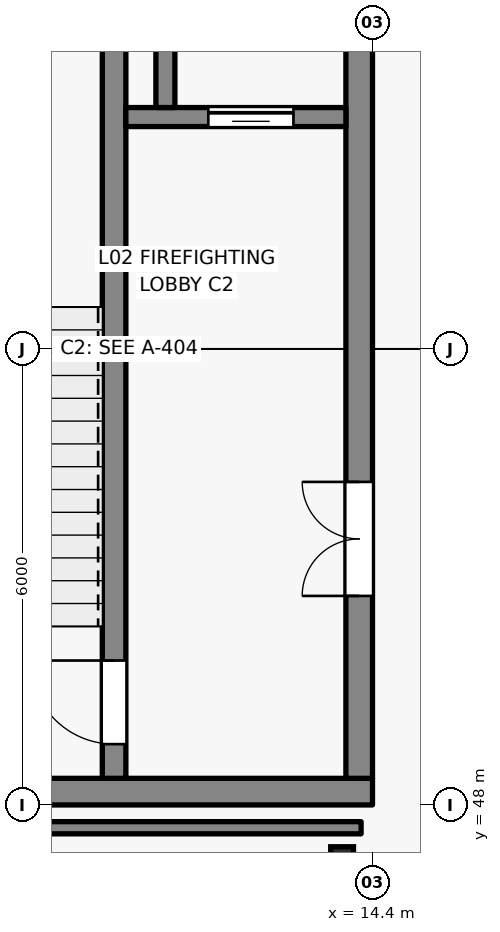
"""IFC4 building model, lengths in metres.
Left out: names, types, materials, properties, quantities, classifications, styles, units other than length and angle.
Written with IfcOpenShell. Run it as: python <this file> out.ifc"""

import sys

from ifc_helpers import new_model, si_unit, direction, frame, frame_2d, origin, origin_2d, place, context, subcontext, project, spatial, rectangle, i_section, extrude, element, fill, save


model = new_model("IFC4")
c1 = context("Model", 3, precision=1e-05, world=origin(), true_north=direction((0.0, 1.0)))
c2 = subcontext(c1, "Body", "Model", "MODEL_VIEW")
j1 = project(units=[si_unit("LENGTHUNIT", "METRE"), si_unit("PLANEANGLEUNIT", "RADIAN")], contexts=[c1])
p1 = place(None, origin())
s1 = spatial("IfcSite", under=j1, at=p1, CompositionType="ELEMENT")
p2 = place(p1, origin())
s2 = spatial("IfcBuilding", under=s1, at=p2, CompositionType="ELEMENT")
p3 = place(p2, frame((0.0, 0.0, 6.0)))
s3 = spatial("IfcBuildingStorey", under=s2, at=p3, CompositionType="ELEMENT", Elevation=6.0)
p4 = place(p3, frame((7.2, 48.175, 0.0), z_axis=(0.0, 0.0, 1.0), x_axis=(1.0, 0.0, 0.0)))
e1 = element("IfcWall", 1, at=p4, inside=s3, PredefinedType="SHEAR", context=c2, shape_type="SweptSolid", body=[
    extrude(rectangle(XDim=7.2, YDim=0.35, at=frame_2d((3.6, 0.0))), origin(), (0.0, 0.0, 1.0), 4.25),
])
p5 = place(p3, frame((14.225, 48.35, 0.0), z_axis=(0.0, 0.0, 1.0), x_axis=(0.0, 1.0, 0.0)))
e2 = element("IfcWall", 2, at=p5, inside=s3, PredefinedType="SHEAR", context=c2, shape_type="SweptSolid", body=[
    extrude(rectangle(XDim=11.3, YDim=0.35, at=frame_2d((5.65, 0.0))), origin(), (0.0, 0.0, 1.0), 4.25),
])
p6 = place(p5, frame((2.4, 0.0, 0.0)))
e3 = element("IfcOpeningElement", 3, at=p6, cuts=e2, PredefinedType="OPENING", context=c2, shape_type="SweptSolid", body=[
    extrude(rectangle(XDim=1.5, YDim=2.15, at=frame_2d((0.75, 1.075))), frame((0.0, 0.185, 0.0), z_axis=(0.0, -1.0, 0.0), x_axis=(1.0, 0.0, 0.0)), (0.0, 0.0, 1.0), 0.37),
])
p7 = place(p3, frame((11.0, 48.35, 0.0), z_axis=(0.0, 0.0, 1.0), x_axis=(0.0, 1.0, 0.0)))
e4 = element("IfcWall", 4, at=p7, inside=s3, PredefinedType="SHEAR", context=c2, shape_type="SweptSolid", body=[
    extrude(rectangle(XDim=11.3, YDim=0.31, at=frame_2d((5.65, 0.0))), origin(), (0.0, 0.0, 1.0), 4.25),
])
p8 = place(p7, frame((0.45, 0.0, 0.0)))
e5 = element("IfcOpeningElement", 5, at=p8, cuts=e4, PredefinedType="OPENING", context=c2, shape_type="SweptSolid", body=[
    extrude(rectangle(XDim=1.1, YDim=2.15, at=frame_2d((0.55, 1.075))), frame((0.0, 0.165, 0.0), z_axis=(0.0, -1.0, 0.0), x_axis=(1.0, 0.0, 0.0)), (0.0, 0.0, 1.0), 0.33),
])
p9 = place(p3, frame((14.0, 47.2, 0.0), z_axis=(0.0, 0.0, 1.0), x_axis=(1.0, 0.0, 0.0)))
e6 = element("IfcColumn", 6, at=p9, inside=s3, PredefinedType="COLUMN", context=c2, shape_type="SweptSolid", body=[
    extrude(i_section(OverallWidth=0.3, OverallDepth=0.5, WebThickness=0.014, FlangeThickness=0.028, FilletRadius=0.027, at=origin_2d()), origin(), (0.0, 0.0, 1.0), 4.5),
])
p10 = place(p3, frame((11.155, 57.05, 0.0), z_axis=(0.0, 0.0, 1.0), x_axis=(1.0, 0.0, 0.0)))
e7 = element("IfcWall", 7, at=p10, inside=s3, PredefinedType="SHEAR", context=c2, shape_type="SweptSolid", body=[
    extrude(rectangle(XDim=2.895, YDim=0.25, at=frame_2d((1.448, 0.0))), origin(), (0.0, 0.0, 1.0), 4.25),
])
p11 = place(p10, frame((1.085, 0.0, 0.0)))
e8 = element("IfcOpeningElement", 8, at=p11, cuts=e7, PredefinedType="OPENING", context=c2, shape_type="SweptSolid", body=[
    extrude(rectangle(XDim=1.12, YDim=2.15, at=frame_2d((0.56, 1.075))), frame((0.0, 0.135, 0.0), z_axis=(0.0, -1.0, 0.0), x_axis=(1.0, 0.0, 0.0)), (0.0, 0.0, 1.0), 0.27),
])
p12 = place(p3, frame((11.675, 57.175, 0.0), z_axis=(0.0, 0.0, 1.0), x_axis=(0.0, 1.0, 0.0)))
e9 = element("IfcWall", 9, at=p12, inside=s3, PredefinedType="SHEAR", context=c2, shape_type="SweptSolid", body=[
    extrude(rectangle(XDim=2.475, YDim=0.25, at=frame_2d((1.237, 0.0))), origin(), (0.0, 0.0, 1.0), 4.25),
])
p13 = place(p3, frame((14.25, 47.7, 0.0), z_axis=(0.0, 0.0, 1.0), x_axis=(-1.0, 0.0, 0.0)))
e10 = element("IfcWall", 10, at=p13, inside=s3, PredefinedType="PARTITIONING", context=c2, shape_type="SweptSolid", body=[
    extrude(rectangle(XDim=9.19, YDim=0.16, at=frame_2d((4.595, 0.0))), origin(), (0.0, 0.0, 1.0), 3.845),
])
p14 = place(p11, origin())
e11 = element("IfcDoor", 11, at=p14, inside=s3, OperationType="SLIDING_TO_LEFT", PredefinedType="DOOR", context=c2, shape_type="SweptSolid", body=[
    extrude(rectangle(XDim=1.12, YDim=2.15, at=frame_2d((0.56, 1.075))), frame((0.0, 0.025, 0.0), z_axis=(0.0, -1.0, 0.0), x_axis=(1.0, 0.0, 0.0)), (0.0, 0.0, 1.0), 0.05),
])
fill(e8, e11)
p15 = place(p6, origin())
e12 = element("IfcDoor", 12, at=p15, inside=s3, OperationType="DOUBLE_DOOR_SINGLE_SWING", PredefinedType="DOOR", context=c2, shape_type="SweptSolid", body=[
    extrude(rectangle(XDim=1.5, YDim=2.15, at=frame_2d((0.75, 1.075))), frame((0.0, 0.025, 0.0), z_axis=(0.0, -1.0, 0.0), x_axis=(1.0, 0.0, 0.0)), (0.0, 0.0, 1.0), 0.05),
])
fill(e3, e12)
p16 = place(p8, origin())
e13 = element("IfcDoor", 13, at=p16, inside=s3, OperationType="SINGLE_SWING_RIGHT", PredefinedType="DOOR", context=c2, shape_type="SweptSolid", body=[
    extrude(rectangle(XDim=1.1, YDim=2.15, at=frame_2d((0.55, 1.075))), frame((0.0, 0.025, 0.0), z_axis=(0.0, -1.0, 0.0), x_axis=(1.0, 0.0, 0.0)), (0.0, 0.0, 1.0), 0.05),
])
fill(e5, e13)
save(model, sys.argv[1])
